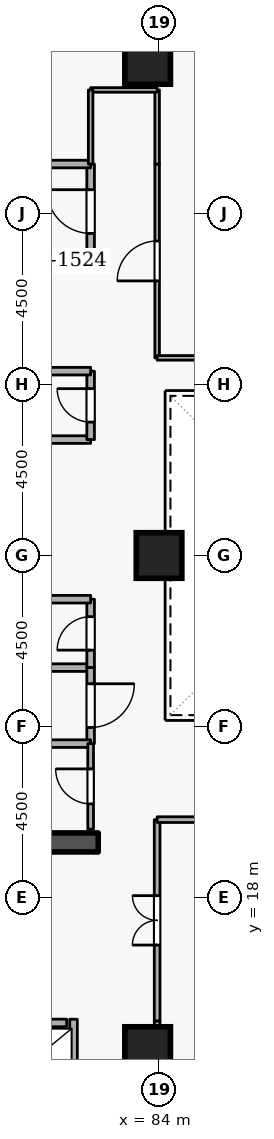
"""IFC4 building model, lengths in metres.
Left out: names, types, materials, properties, quantities, classifications, styles, units other than length and angle.
Written with IfcOpenShell. Run it as: python <this file> out.ifc"""

import sys

from ifc_helpers import new_model, si_unit, direction, frame, frame_2d, origin, origin_2d, place, context, subcontext, project, spatial, rectangle, extrude, element, fill, save


model = new_model("IFC4")
c1 = context("Model", 3, precision=1e-05, world=origin(), true_north=direction((0.0, 1.0)))
c2 = subcontext(c1, "Body", "Model", "MODEL_VIEW")
j1 = project(units=[si_unit("LENGTHUNIT", "METRE"), si_unit("PLANEANGLEUNIT", "RADIAN")], contexts=[c1])
p1 = place(None, origin())
s1 = spatial("IfcSite", under=j1, at=p1, CompositionType="ELEMENT")
p2 = place(p1, origin())
s2 = spatial("IfcBuilding", under=s1, at=p2, CompositionType="ELEMENT")
p3 = place(p2, frame((0.0, 0.0, 126.9)))
s3 = spatial("IfcBuildingStorey", under=s2, at=p3, CompositionType="ELEMENT", Elevation=126.9)
p4 = place(p3, frame((76.6, 19.45, 0.0), z_axis=(0.0, 0.0, 1.0), x_axis=(1.0, 0.0, 0.0)))
e1 = element("IfcWall", 1, at=p4, inside=s3, PredefinedType="SHEAR", context=c2, shape_type="SweptSolid", body=[
    extrude(rectangle(XDim=5.8, YDim=0.5, at=frame_2d((2.9, 0.0))), origin(), (0.0, 0.0, 1.0), 3.6),
])
for number, where, z_axis, x_axis in (
    (2, (83.7, 14.0, 0.0), (0.0, 0.0, 1.0), (1.0, 0.0, 0.0)),
    (3, (83.7, 40.0, 0.0), (0.0, 0.0, 1.0), (1.0, 0.0, 0.0)),
    (4, (84.0, 27.0, 0.0), (0.0, 0.0, 1.0), (1.0, 0.0, 0.0)),
):
    element("IfcColumn", number, at=place(p3, frame(where, z_axis=z_axis, x_axis=x_axis)), inside=s3, PredefinedType="COLUMN", context=c2, shape_type="SweptSolid", body=[
        extrude(rectangle(XDim=1.2, YDim=1.2, at=origin_2d()), origin(), (0.0, 0.0, 1.0), 3.6),
    ])
p5 = place(p3, frame((79.63, 14.7, 0.0), z_axis=(0.0, 0.0, 1.0), x_axis=(1.0, 0.0, 0.0)))
e5 = element("IfcWall", 5, at=p5, inside=s3, PredefinedType="STANDARD", context=c2, shape_type="SweptSolid", body=[
    extrude(rectangle(XDim=1.94, YDim=0.2, at=frame_2d((0.97, 0.0))), origin(), (0.0, 0.0, 1.0), 3.34),
])
p6 = place(p5, frame((0.46, 0.0, 0.0)))
e6 = element("IfcOpeningElement", 6, at=p6, cuts=e5, PredefinedType="OPENING", context=c2, shape_type="SweptSolid", body=[
    extrude(rectangle(XDim=1.02, YDim=2.06, at=frame_2d((0.51, 1.03))), frame((0.0, 0.11, 0.0), z_axis=(0.0, -1.0, 0.0), x_axis=(1.0, 0.0, 0.0)), (0.0, 0.0, 1.0), 0.22),
])
p7 = place(p3, frame((81.75, 12.612, 0.0), z_axis=(0.0, 0.0, 1.0), x_axis=(0.0, 1.0, 0.0)))
e7 = element("IfcWall", 7, at=p7, inside=s3, PredefinedType="STANDARD", context=c2, shape_type="SweptSolid", body=[
    extrude(rectangle(XDim=2.186, YDim=0.2, at=frame_2d((1.093, 0.0))), origin(), (0.0, 0.0, 1.0), 3.34),
])
p8 = place(p3, frame((79.9, 34.8, 0.0), z_axis=(0.0, 0.0, 1.0), x_axis=(1.0, 0.0, 0.0)))
e8 = element("IfcWall", 8, at=p8, inside=s3, PredefinedType="STANDARD", context=c2, shape_type="SweptSolid", body=[
    extrude(rectangle(XDim=2.3, YDim=0.2, at=frame_2d((1.15, 0.0))), origin(), (0.0, 0.0, 1.0), 2.545),
])
p9 = place(p3, frame((82.2, 34.8, 0.0), z_axis=(0.0, 0.0, 1.0), x_axis=(0.0, 1.0, 0.0)))
e9 = element("IfcWall", 9, at=p9, inside=s3, PredefinedType="STANDARD", context=c2, shape_type="SweptSolid", body=[
    extrude(rectangle(XDim=2.5, YDim=0.2, at=frame_2d((1.25, 0.0))), origin(), (0.0, 0.0, 1.0), 3.34),
])
p10 = place(p9, frame((0.675, 0.0, 0.0)))
e10 = element("IfcOpeningElement", 10, at=p10, cuts=e9, PredefinedType="OPENING", context=c2, shape_type="SweptSolid", body=[
    extrude(rectangle(XDim=1.15, YDim=2.1, at=frame_2d((0.575, 1.05))), frame((0.0, 0.11, 0.0), z_axis=(0.0, -1.0, 0.0), x_axis=(1.0, 0.0, 0.0)), (0.0, 0.0, 1.0), 0.22),
])
p11 = place(p3, frame((82.2, 37.3, 0.0), z_axis=(0.0, 0.0, 1.0), x_axis=(-1.0, 0.0, 0.0)))
e11 = element("IfcWall", 11, at=p11, inside=s3, PredefinedType="STANDARD", context=c2, shape_type="SweptSolid", body=[
    extrude(rectangle(XDim=5.7, YDim=0.2, at=frame_2d((2.85, 0.0))), origin(), (0.0, 0.0, 1.0), 3.34),
])
p12 = place(p3, frame((80.15, 24.05, 0.0), z_axis=(0.0, 0.0, 1.0), x_axis=(1.0, 0.0, 0.0)))
e12 = element("IfcWall", 12, at=p12, inside=s3, PredefinedType="STANDARD", context=c2, shape_type="SweptSolid", body=[
    extrude(rectangle(XDim=2.05, YDim=0.2, at=frame_2d((1.025, 0.0))), origin(), (0.0, 0.0, 1.0), 3.34),
])
p13 = place(p3, frame((82.2, 24.05, 0.0), z_axis=(0.0, 0.0, 1.0), x_axis=(0.0, 1.0, 0.0)))
e13 = element("IfcWall", 13, at=p13, inside=s3, PredefinedType="STANDARD", context=c2, shape_type="SweptSolid", body=[
    extrude(rectangle(XDim=1.8, YDim=0.2, at=frame_2d((0.9, 0.0))), origin(), (0.0, 0.0, 1.0), 3.34),
])
p14 = place(p13, frame((0.46, 0.0, 0.0)))
e14 = element("IfcOpeningElement", 14, at=p14, cuts=e13, PredefinedType="OPENING", context=c2, shape_type="SweptSolid", body=[
    extrude(rectangle(XDim=0.88, YDim=2.04, at=frame_2d((0.44, 1.02))), frame((0.0, 0.11, 0.0), z_axis=(0.0, -1.0, 0.0), x_axis=(1.0, 0.0, 0.0)), (0.0, 0.0, 1.0), 0.22),
])
for number, where, z_axis, x_axis in (
    (15, (82.2, 25.85, 0.0), (0.0, 0.0, 1.0), (-1.0, 0.0, 0.0)),
    (16, (80.15, 30.05, 0.0), (0.0, 0.0, 1.0), (1.0, 0.0, 0.0)),
):
    element("IfcWall", number, at=place(p3, frame(where, z_axis=z_axis, x_axis=x_axis)), inside=s3, PredefinedType="STANDARD", context=c2, shape_type="SweptSolid", body=[
        extrude(rectangle(XDim=2.05, YDim=0.2, at=frame_2d((1.025, 0.0))), origin(), (0.0, 0.0, 1.0), 3.34),
    ])
p15 = place(p3, frame((82.2, 30.05, 0.0), z_axis=(0.0, 0.0, 1.0), x_axis=(0.0, 1.0, 0.0)))
e17 = element("IfcWall", 17, at=p15, inside=s3, PredefinedType="STANDARD", context=c2, shape_type="SweptSolid", body=[
    extrude(rectangle(XDim=1.8, YDim=0.2, at=frame_2d((0.9, 0.0))), origin(), (0.0, 0.0, 1.0), 3.34),
])
p16 = place(p15, frame((0.46, 0.0, 0.0)))
e18 = element("IfcOpeningElement", 18, at=p16, cuts=e17, PredefinedType="OPENING", context=c2, shape_type="SweptSolid", body=[
    extrude(rectangle(XDim=0.88, YDim=2.04, at=frame_2d((0.44, 1.02))), frame((0.0, 0.11, 0.0), z_axis=(0.0, -1.0, 0.0), x_axis=(1.0, 0.0, 0.0)), (0.0, 0.0, 1.0), 0.22),
])
p17 = place(p3, frame((82.2, 31.85, 0.0), z_axis=(0.0, 0.0, 1.0), x_axis=(-1.0, 0.0, 0.0)))
e19 = element("IfcWall", 19, at=p17, inside=s3, PredefinedType="STANDARD", context=c2, shape_type="SweptSolid", body=[
    extrude(rectangle(XDim=2.05, YDim=0.2, at=frame_2d((1.025, 0.0))), origin(), (0.0, 0.0, 1.0), 3.34),
])
p18 = place(p3, frame((82.2, 24.05, 0.0), z_axis=(0.0, 0.0, 1.0), x_axis=(0.0, -1.0, 0.0)))
e20 = element("IfcWall", 20, at=p18, inside=s3, PredefinedType="STANDARD", context=c2, shape_type="SweptSolid", body=[
    extrude(rectangle(XDim=2.0, YDim=0.2, at=frame_2d((1.0, 0.0))), origin(), (0.0, 0.0, 1.0), 3.34),
])
p19 = place(p18, frame((0.425, 0.0, 0.0)))
e21 = element("IfcOpeningElement", 21, at=p19, cuts=e20, PredefinedType="OPENING", context=c2, shape_type="SweptSolid", body=[
    extrude(rectangle(XDim=1.15, YDim=2.1, at=frame_2d((0.575, 1.05))), frame((0.0, 0.11, 0.0), z_axis=(0.0, -1.0, 0.0), x_axis=(1.0, 0.0, 0.0)), (0.0, 0.0, 1.0), 0.22),
])
p20 = place(p3, frame((82.2, 22.05, 0.0), z_axis=(0.0, 0.0, 1.0), x_axis=(-1.0, 0.0, 0.0)))
e22 = element("IfcWall", 22, at=p20, inside=s3, PredefinedType="STANDARD", context=c2, shape_type="SweptSolid", body=[
    extrude(rectangle(XDim=2.05, YDim=0.2, at=frame_2d((1.025, 0.0))), origin(), (0.0, 0.0, 1.0), 3.34),
])
p21 = place(p3, frame((82.2, 19.8, 0.0), z_axis=(0.0, 0.0, 1.0), x_axis=(0.0, 1.0, 0.0)))
e23 = element("IfcWall", 23, at=p21, inside=s3, PredefinedType="PARTITIONING", context=c2, shape_type="SweptSolid", body=[
    extrude(rectangle(XDim=2.25, YDim=0.15, at=frame_2d((1.125, 0.0))), origin(), (0.0, 0.0, 1.0), 3.34),
])
p22 = place(p21, frame((0.665, 0.0, 0.0)))
e24 = element("IfcOpeningElement", 24, at=p22, cuts=e23, PredefinedType="OPENING", context=c2, shape_type="SweptSolid", body=[
    extrude(rectangle(XDim=0.92, YDim=2.08, at=frame_2d((0.46, 1.04))), frame((0.0, 0.085, 0.0), z_axis=(0.0, -1.0, 0.0), x_axis=(1.0, 0.0, 0.0)), (0.0, 0.0, 1.0), 0.17),
])
p23 = place(p3, frame((83.95, 14.75, 0.0), z_axis=(0.0, 0.0, 1.0), x_axis=(0.0, 1.0, 0.0)))
e25 = element("IfcWall", 25, at=p23, inside=s3, PredefinedType="PARTITIONING", context=c2, shape_type="SweptSolid", body=[
    extrude(rectangle(XDim=5.3, YDim=0.15, at=frame_2d((2.65, 0.0))), origin(), (0.0, 0.0, 1.0), 3.34),
])
p24 = place(p23, frame((2.0, 0.0, 0.0)))
e26 = element("IfcOpeningElement", 26, at=p24, cuts=e25, PredefinedType="OPENING", context=c2, shape_type="SweptSolid", body=[
    extrude(rectangle(XDim=1.3, YDim=2.12, at=frame_2d((0.65, 1.06))), frame((0.0, 0.085, 0.0), z_axis=(0.0, -1.0, 0.0), x_axis=(1.0, 0.0, 0.0)), (0.0, 0.0, 1.0), 0.17),
])
p25 = place(p3, frame((83.95, 20.05, 0.0), z_axis=(0.0, 0.0, 1.0), x_axis=(1.0, 0.0, 0.0)))
e27 = element("IfcWall", 27, at=p25, inside=s3, PredefinedType="PARTITIONING", context=c2, shape_type="SweptSolid", body=[
    extrude(rectangle(XDim=4.55, YDim=0.15, at=frame_2d((2.275, 0.0))), origin(), (0.0, 0.0, 1.0), 3.34),
])
p26 = place(p3, frame((83.95, 12.4, 0.0), z_axis=(0.0, 0.0, 1.0), x_axis=(0.0, 1.0, 0.0)))
e28 = element("IfcWall", 28, at=p26, inside=s3, PredefinedType="PARTITIONING", context=c2, shape_type="SweptSolid", body=[
    extrude(rectangle(XDim=2.35, YDim=0.15, at=frame_2d((1.175, 0.0))), origin(), (0.0, 0.0, 1.0), 3.34),
])
p27 = place(p3, frame((83.95, 32.2, 0.0), z_axis=(0.0, 0.0, 1.0), x_axis=(0.0, 1.0, 0.0)))
e29 = element("IfcWall", 29, at=p27, inside=s3, PredefinedType="PARTITIONING", context=c2, shape_type="SweptSolid", body=[
    extrude(rectangle(XDim=5.1, YDim=0.12, at=frame_2d((2.55, 0.0))), origin(), (0.0, 0.0, 1.0), 3.34),
])
p28 = place(p27, frame((2.025, 0.0, 0.0)))
e30 = element("IfcOpeningElement", 30, at=p28, cuts=e29, PredefinedType="OPENING", context=c2, shape_type="SweptSolid", body=[
    extrude(rectangle(XDim=1.05, YDim=2.1, at=frame_2d((0.525, 1.05))), frame((0.0, 0.07, 0.0), z_axis=(0.0, -1.0, 0.0), x_axis=(1.0, 0.0, 0.0)), (0.0, 0.0, 1.0), 0.14),
])
p29 = place(p3, frame((83.95, 37.3, 0.0), z_axis=(0.0, 0.0, 1.0), x_axis=(0.0, 1.0, 0.0)))
e31 = element("IfcWall", 31, at=p29, inside=s3, PredefinedType="PARTITIONING", context=c2, shape_type="SweptSolid", body=[
    extrude(rectangle(XDim=1.95, YDim=0.12, at=frame_2d((0.975, 0.0))), origin(), (0.0, 0.0, 1.0), 3.34),
])
p30 = place(p3, frame((83.95, 39.25, 0.0), z_axis=(0.0, 0.0, 1.0), x_axis=(-1.0, 0.0, 0.0)))
e32 = element("IfcWall", 32, at=p30, inside=s3, PredefinedType="PARTITIONING", context=c2, shape_type="SweptSolid", body=[
    extrude(rectangle(XDim=1.75, YDim=0.12, at=frame_2d((0.875, 0.0))), origin(), (0.0, 0.0, 1.0), 3.34),
])
p31 = place(p3, frame((82.2, 39.25, 0.0), z_axis=(0.0, 0.0, 1.0), x_axis=(0.0, -1.0, 0.0)))
e33 = element("IfcWall", 33, at=p31, inside=s3, PredefinedType="PARTITIONING", context=c2, shape_type="SweptSolid", body=[
    extrude(rectangle(XDim=1.95, YDim=0.12, at=frame_2d((0.975, 0.0))), origin(), (0.0, 0.0, 1.0), 3.34),
])
p32 = place(p3, frame((88.5, 32.2, 0.0), z_axis=(0.0, 0.0, 1.0), x_axis=(-1.0, 0.0, 0.0)))
e34 = element("IfcWall", 34, at=p32, inside=s3, PredefinedType="PARTITIONING", context=c2, shape_type="SweptSolid", body=[
    extrude(rectangle(XDim=4.55, YDim=0.12, at=frame_2d((2.275, 0.0))), origin(), (0.0, 0.0, 1.0), 3.34),
])
p33 = place(p10, origin())
e35 = element("IfcDoor", 35, at=p33, inside=s3, OperationType="SINGLE_SWING_RIGHT", PredefinedType="DOOR", context=c2, shape_type="SweptSolid", body=[
    extrude(rectangle(XDim=1.15, YDim=2.1, at=frame_2d((0.575, 1.05))), frame((0.0, 0.025, 0.0), z_axis=(0.0, -1.0, 0.0), x_axis=(1.0, 0.0, 0.0)), (0.0, 0.0, 1.0), 0.05),
])
fill(e10, e35)
p34 = place(p14, origin())
e36 = element("IfcDoor", 36, at=p34, inside=s3, OperationType="SINGLE_SWING_LEFT", PredefinedType="DOOR", context=c2, shape_type="SweptSolid", body=[
    extrude(rectangle(XDim=0.88, YDim=2.04, at=frame_2d((0.44, 1.02))), frame((0.0, 0.025, 0.0), z_axis=(0.0, -1.0, 0.0), x_axis=(1.0, 0.0, 0.0)), (0.0, 0.0, 1.0), 0.05),
])
fill(e14, e36)
p35 = place(p16, origin())
e37 = element("IfcDoor", 37, at=p35, inside=s3, OperationType="SINGLE_SWING_RIGHT", PredefinedType="DOOR", context=c2, shape_type="SweptSolid", body=[
    extrude(rectangle(XDim=0.88, YDim=2.04, at=frame_2d((0.44, 1.02))), frame((0.0, 0.025, 0.0), z_axis=(0.0, -1.0, 0.0), x_axis=(1.0, 0.0, 0.0)), (0.0, 0.0, 1.0), 0.05),
])
fill(e18, e37)
p36 = place(p22, origin())
e38 = element("IfcDoor", 38, at=p36, inside=s3, OperationType="SINGLE_SWING_RIGHT", PredefinedType="DOOR", context=c2, shape_type="SweptSolid", body=[
    extrude(rectangle(XDim=0.92, YDim=2.08, at=frame_2d((0.46, 1.04))), frame((0.0, 0.025, 0.0), z_axis=(0.0, -1.0, 0.0), x_axis=(1.0, 0.0, 0.0)), (0.0, 0.0, 1.0), 0.05),
])
fill(e24, e38)
p37 = place(p19, origin())
e39 = element("IfcDoor", 39, at=p37, inside=s3, OperationType="SINGLE_SWING_LEFT", PredefinedType="DOOR", context=c2, shape_type="SweptSolid", body=[
    extrude(rectangle(XDim=1.15, YDim=2.1, at=frame_2d((0.575, 1.05))), frame((0.0, 0.025, 0.0), z_axis=(0.0, -1.0, 0.0), x_axis=(1.0, 0.0, 0.0)), (0.0, 0.0, 1.0), 0.05),
])
fill(e21, e39)
p38 = place(p24, origin())
e40 = element("IfcDoor", 40, at=p38, inside=s3, OperationType="DOUBLE_DOOR_SINGLE_SWING", PredefinedType="DOOR", context=c2, shape_type="SweptSolid", body=[
    extrude(rectangle(XDim=1.3, YDim=2.12, at=frame_2d((0.65, 1.06))), frame((0.0, 0.025, 0.0), z_axis=(0.0, -1.0, 0.0), x_axis=(1.0, 0.0, 0.0)), (0.0, 0.0, 1.0), 0.05),
])
fill(e26, e40)
p39 = place(p28, origin())
e41 = element("IfcDoor", 41, at=p39, inside=s3, OperationType="SINGLE_SWING_LEFT", PredefinedType="DOOR", context=c2, shape_type="SweptSolid", body=[
    extrude(rectangle(XDim=1.05, YDim=2.1, at=frame_2d((0.525, 1.05))), frame((0.0, 0.025, 0.0), z_axis=(0.0, -1.0, 0.0), x_axis=(1.0, 0.0, 0.0)), (0.0, 0.0, 1.0), 0.05),
])
fill(e30, e41)
save(model, sys.argv[1])
